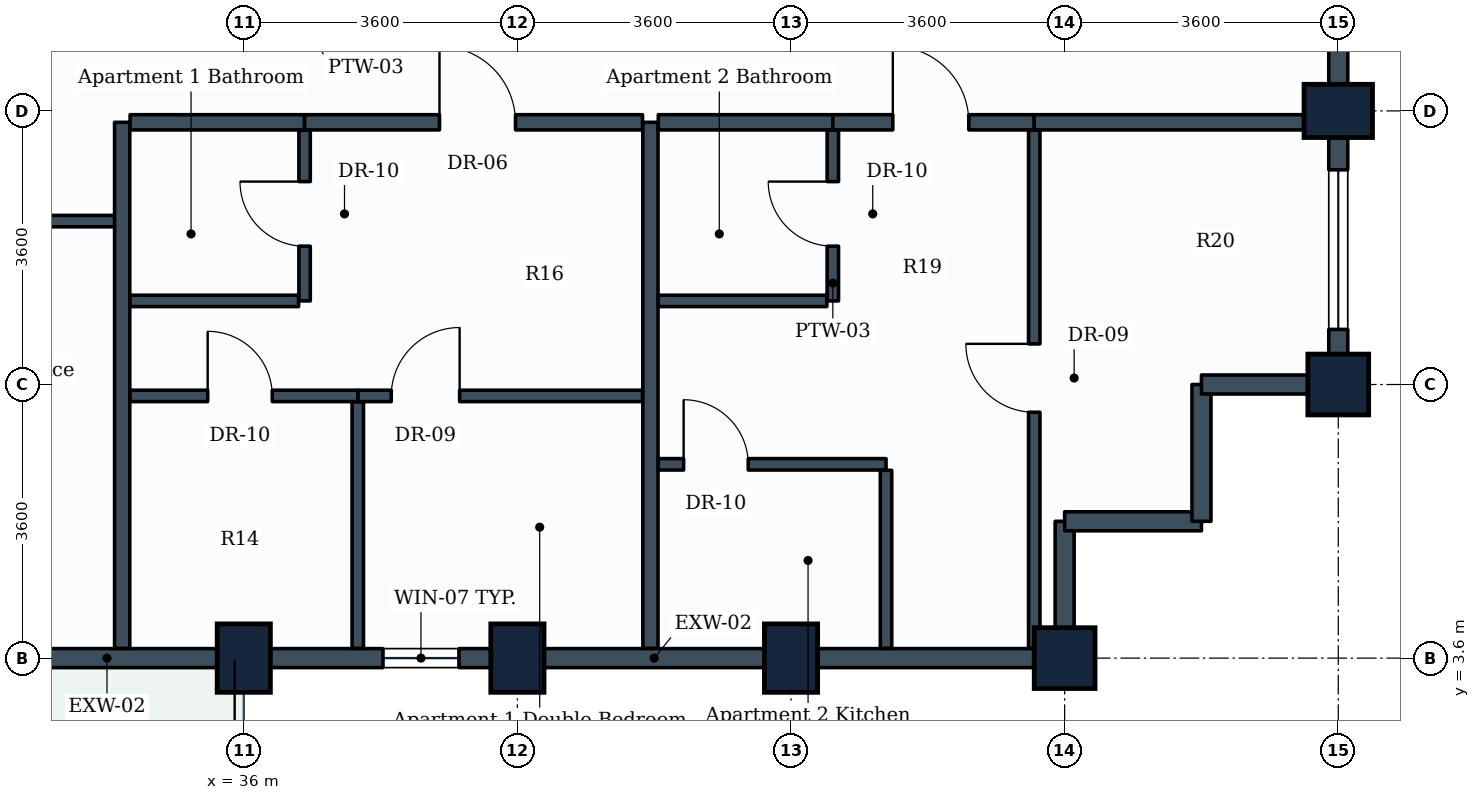
"""IFC4 building model, lengths in metres.
Left out: names, types, materials, properties, quantities, classifications, styles, units other than length and angle.
Written with IfcOpenShell. Run it as: python <this file> out.ifc"""

import sys

from ifc_helpers import new_model, si_unit, direction, frame, frame_2d, origin, origin_2d, place, context, subcontext, project, spatial, rectangle, extrude, element, fill, save


model = new_model("IFC4")
c1 = context("Model", 3, precision=1e-05, world=origin(), true_north=direction((0.0, 1.0)))
c2 = subcontext(c1, "Body", "Model", "MODEL_VIEW")
j1 = project(units=[si_unit("LENGTHUNIT", "METRE"), si_unit("PLANEANGLEUNIT", "RADIAN")], contexts=[c1])
p1 = place(None, origin())
s1 = spatial("IfcSite", under=j1, at=p1, CompositionType="ELEMENT")
p2 = place(p1, origin())
s2 = spatial("IfcBuilding", under=s1, at=p2, CompositionType="ELEMENT")
p3 = place(p2, frame((0.0, 0.0, 178.6)))
s3 = spatial("IfcBuildingStorey", under=s2, at=p3, CompositionType="ELEMENT", Elevation=178.6)
for number, where, z_axis, x_axis in (
    (1, (36.0, 3.6, 0.0), (0.0, 0.0, 1.0), (1.0, 0.0, 0.0)),
    (2, (39.6, 3.6, 0.0), (0.0, 0.0, 1.0), (1.0, 0.0, 0.0)),
    (3, (43.2, 3.6, 0.0), (0.0, 0.0, 1.0), (1.0, 0.0, 0.0)),
):
    element("IfcColumn", number, at=place(p3, frame(where, z_axis=z_axis, x_axis=x_axis)), inside=s3, PredefinedType="COLUMN", context=c2, shape_type="SweptSolid", body=[
        extrude(rectangle(XDim=0.7, YDim=0.9, at=origin_2d()), origin(), (0.0, 0.0, 1.0), 3.8),
    ])
for number, where, z_axis, x_axis in (
    (4, (46.8, 3.6, 0.0), (0.0, 0.0, 1.0), (1.0, 0.0, 0.0)),
    (5, (50.4, 7.2, 0.0), (0.0, 0.0, 1.0), (1.0, 0.0, 0.0)),
):
    element("IfcColumn", number, at=place(p3, frame(where, z_axis=z_axis, x_axis=x_axis)), inside=s3, PredefinedType="COLUMN", context=c2, shape_type="SweptSolid", body=[
        extrude(rectangle(XDim=0.8, YDim=0.8, at=origin_2d()), origin(), (0.0, 0.0, 1.0), 3.8),
    ])
p4 = place(p3, frame((50.4, 10.8, 0.0), z_axis=(0.0, 0.0, 1.0), x_axis=(0.0, 1.0, 0.0)))
e6 = element("IfcColumn", 6, at=p4, inside=s3, PredefinedType="COLUMN", context=c2, shape_type="SweptSolid", body=[
    extrude(rectangle(XDim=0.7, YDim=0.9, at=origin_2d()), origin(), (0.0, 0.0, 1.0), 3.8),
])
p5 = place(p3, frame((36.0, 3.6, 0.0), z_axis=(0.0, 0.0, 1.0), x_axis=(-1.0, 0.0, 0.0)))
e7 = element("IfcWall", 7, at=p5, inside=s3, PredefinedType="STANDARD", context=c2, shape_type="SweptSolid", body=[
    extrude(rectangle(XDim=3.6, YDim=0.25, at=frame_2d((1.8, 0.0))), origin(), (0.0, 0.0, 1.0), 2.93),
])
p6 = place(p3, frame((39.6, 3.6, 0.0), z_axis=(0.0, 0.0, 1.0), x_axis=(-1.0, 0.0, 0.0)))
e8 = element("IfcWall", 8, at=p6, inside=s3, PredefinedType="STANDARD", context=c2, shape_type="SweptSolid", body=[
    extrude(rectangle(XDim=3.6, YDim=0.25, at=frame_2d((1.8, 0.0))), origin(), (0.0, 0.0, 1.0), 2.93),
])
p7 = place(p6, frame((0.769, 0.0, 0.85)))
e9 = element("IfcOpeningElement", 9, at=p7, cuts=e8, PredefinedType="OPENING", context=c2, shape_type="SweptSolid", body=[
    extrude(rectangle(XDim=1.0, YDim=1.35, at=frame_2d((0.5, 0.675))), frame((0.0, 0.135, 0.0), z_axis=(0.0, -1.0, 0.0), x_axis=(1.0, 0.0, 0.0)), (0.0, 0.0, 1.0), 0.27),
])
p8 = place(p3, frame((43.2, 3.6, 0.0), z_axis=(0.0, 0.0, 1.0), x_axis=(-1.0, 0.0, 0.0)))
e10 = element("IfcWall", 10, at=p8, inside=s3, PredefinedType="STANDARD", context=c2, shape_type="SweptSolid", body=[
    extrude(rectangle(XDim=3.6, YDim=0.25, at=frame_2d((1.8, 0.0))), origin(), (0.0, 0.0, 1.0), 2.93),
])
p9 = place(p3, frame((46.8, 3.6, 0.0), z_axis=(0.0, 0.0, 1.0), x_axis=(-1.0, 0.0, 0.0)))
e11 = element("IfcWall", 11, at=p9, inside=s3, PredefinedType="STANDARD", context=c2, shape_type="SweptSolid", body=[
    extrude(rectangle(XDim=3.6, YDim=0.25, at=frame_2d((1.8, 0.0))), origin(), (0.0, 0.0, 1.0), 2.93),
])
p10 = place(p3, frame((46.8, 5.4, 0.0), z_axis=(0.0, 0.0, 1.0), x_axis=(0.0, -1.0, 0.0)))
e12 = element("IfcWall", 12, at=p10, inside=s3, PredefinedType="STANDARD", context=c2, shape_type="SweptSolid", body=[
    extrude(rectangle(XDim=1.8, YDim=0.25, at=frame_2d((0.9, 0.0))), origin(), (0.0, 0.0, 1.0), 2.93),
])
for number, where, z_axis, x_axis in (
    (13, (48.6, 5.4, 0.0), (0.0, 0.0, 1.0), (-1.0, 0.0, 0.0)),
    (14, (48.6, 7.2, 0.0), (0.0, 0.0, 1.0), (0.0, -1.0, 0.0)),
):
    element("IfcWall", number, at=place(p3, frame(where, z_axis=z_axis, x_axis=x_axis)), inside=s3, PredefinedType="STANDARD", context=c2, shape_type="SweptSolid", body=[
        extrude(rectangle(XDim=1.8, YDim=0.25, at=frame_2d((0.9, 0.0))), origin(), (0.0, 0.0, 1.0), 3.535),
    ])
p11 = place(p3, frame((50.4, 7.2, 0.0), z_axis=(0.0, 0.0, 1.0), x_axis=(-1.0, 0.0, 0.0)))
e15 = element("IfcWall", 15, at=p11, inside=s3, PredefinedType="STANDARD", context=c2, shape_type="SweptSolid", body=[
    extrude(rectangle(XDim=1.8, YDim=0.25, at=frame_2d((0.9, 0.0))), origin(), (0.0, 0.0, 1.0), 2.93),
])
p12 = place(p3, frame((50.4, 10.8, 0.0), z_axis=(0.0, 0.0, 1.0), x_axis=(0.0, -1.0, 0.0)))
e16 = element("IfcWall", 16, at=p12, inside=s3, PredefinedType="STANDARD", context=c2, shape_type="SweptSolid", body=[
    extrude(rectangle(XDim=3.6, YDim=0.25, at=frame_2d((1.8, 0.0))), origin(), (0.0, 0.0, 1.0), 2.93),
])
p13 = place(p12, frame((0.775, 0.0, 0.85)))
e17 = element("IfcOpeningElement", 17, at=p13, cuts=e16, PredefinedType="OPENING", context=c2, shape_type="SweptSolid", body=[
    extrude(rectangle(XDim=2.1, YDim=1.35, at=frame_2d((1.05, 0.675))), frame((0.0, 0.135, 0.0), z_axis=(0.0, -1.0, 0.0), x_axis=(1.0, 0.0, 0.0)), (0.0, 0.0, 1.0), 0.27),
])
p14 = place(p3, frame((50.4, 14.4, 0.0), z_axis=(0.0, 0.0, 1.0), x_axis=(0.0, -1.0, 0.0)))
e18 = element("IfcWall", 18, at=p14, inside=s3, PredefinedType="STANDARD", context=c2, shape_type="SweptSolid", body=[
    extrude(rectangle(XDim=3.6, YDim=0.25, at=frame_2d((1.8, 0.0))), origin(), (0.0, 0.0, 1.0), 2.93),
])
p15 = place(p3, frame((28.879, 9.35, 0.0), z_axis=(0.0, 0.0, 1.0), x_axis=(1.0, 0.0, 0.0)))
e19 = element("IfcWall", 19, at=p15, inside=s3, PredefinedType="PARTITIONING", context=c2, shape_type="SweptSolid", body=[
    extrude(rectangle(XDim=5.521, YDim=0.15, at=frame_2d((2.76, 0.0))), origin(), (0.0, 0.0, 1.0), 3.535),
])
p16 = place(p15, frame((0.36, 0.0, 0.0)))
e20 = element("IfcOpeningElement", 20, at=p16, cuts=e19, PredefinedType="OPENING", context=c2, shape_type="SweptSolid", body=[
    extrude(rectangle(XDim=1.0, YDim=2.1, at=frame_2d((0.5, 1.05))), frame((0.0, 0.085, 0.0), z_axis=(0.0, -1.0, 0.0), x_axis=(1.0, 0.0, 0.0)), (0.0, 0.0, 1.0), 0.17),
])
for number, where, z_axis, x_axis in (
    (21, (34.4, 3.729, 0.0), (0.0, 0.0, 1.0), (0.0, 1.0, 0.0)),
    (22, (41.35, 3.729, 0.0), (0.0, 0.0, 1.0), (0.0, 1.0, 0.0)),
):
    element("IfcWall", number, at=place(p3, frame(where, z_axis=z_axis, x_axis=x_axis)), inside=s3, PredefinedType="PARTITIONING", context=c2, shape_type="SweptSolid", body=[
        extrude(rectangle(XDim=6.921, YDim=0.2, at=frame_2d((3.46, 0.0))), origin(), (0.0, 0.0, 1.0), 2.93),
    ])
p17 = place(p3, frame((34.504, 10.65, 0.0), z_axis=(0.0, 0.0, 1.0), x_axis=(1.0, 0.0, 0.0)))
e23 = element("IfcWall", 23, at=p17, inside=s3, PredefinedType="PARTITIONING", context=c2, shape_type="SweptSolid", body=[
    extrude(rectangle(XDim=2.296, YDim=0.2, at=frame_2d((1.148, 0.0))), origin(), (0.0, 0.0, 1.0), 3.22),
])
p18 = place(p3, frame((36.8, 8.3, 0.0), z_axis=(0.0, 0.0, 1.0), x_axis=(0.0, 1.0, 0.0)))
e24 = element("IfcWall", 24, at=p18, inside=s3, PredefinedType="PARTITIONING", context=c2, shape_type="SweptSolid", body=[
    extrude(rectangle(XDim=2.246, YDim=0.15, at=frame_2d((1.123, 0.0))), origin(), (0.0, 0.0, 1.0), 3.535),
])
p19 = place(p18, frame((0.72, 0.0, 0.0)))
e25 = element("IfcOpeningElement", 25, at=p19, cuts=e24, PredefinedType="OPENING", context=c2, shape_type="SweptSolid", body=[
    extrude(rectangle(XDim=0.85, YDim=2.1, at=frame_2d((0.425, 1.05))), frame((0.0, 0.085, 0.0), z_axis=(0.0, -1.0, 0.0), x_axis=(1.0, 0.0, 0.0)), (0.0, 0.0, 1.0), 0.17),
])
p20 = place(p3, frame((34.504, 8.3, 0.0), z_axis=(0.0, 0.0, 1.0), x_axis=(1.0, 0.0, 0.0)))
e26 = element("IfcWall", 26, at=p20, inside=s3, PredefinedType="PARTITIONING", context=c2, shape_type="SweptSolid", body=[
    extrude(rectangle(XDim=2.217, YDim=0.15, at=frame_2d((1.108, 0.0))), origin(), (0.0, 0.0, 1.0), 3.22),
])
p21 = place(p3, frame((36.8, 10.65, 0.0), z_axis=(0.0, 0.0, 1.0), x_axis=(1.0, 0.0, 0.0)))
e27 = element("IfcWall", 27, at=p21, inside=s3, PredefinedType="PARTITIONING", context=c2, shape_type="SweptSolid", body=[
    extrude(rectangle(XDim=4.446, YDim=0.2, at=frame_2d((2.223, 0.0))), origin(), (0.0, 0.0, 1.0), 3.17),
])
p22 = place(p21, frame((1.775, 0.0, 0.0)))
e28 = element("IfcOpeningElement", 28, at=p22, cuts=e27, PredefinedType="OPENING", context=c2, shape_type="SweptSolid", body=[
    extrude(rectangle(XDim=1.0, YDim=2.1, at=frame_2d((0.5, 1.05))), frame((0.0, 0.11, 0.0), z_axis=(0.0, -1.0, 0.0), x_axis=(1.0, 0.0, 0.0)), (0.0, 0.0, 1.0), 0.22),
])
p23 = place(p3, frame((37.5, 7.05, 0.0), z_axis=(0.0, 0.0, 1.0), x_axis=(1.0, 0.0, 0.0)))
e29 = element("IfcWall", 29, at=p23, inside=s3, PredefinedType="PARTITIONING", context=c2, shape_type="SweptSolid", body=[
    extrude(rectangle(XDim=3.746, YDim=0.15, at=frame_2d((1.873, 0.0))), origin(), (0.0, 0.0, 1.0), 3.17),
])
p24 = place(p23, frame((0.44, 0.0, 0.0)))
e30 = element("IfcOpeningElement", 30, at=p24, cuts=e29, PredefinedType="OPENING", context=c2, shape_type="SweptSolid", body=[
    extrude(rectangle(XDim=0.9, YDim=2.1, at=frame_2d((0.45, 1.05))), frame((0.0, 0.085, 0.0), z_axis=(0.0, -1.0, 0.0), x_axis=(1.0, 0.0, 0.0)), (0.0, 0.0, 1.0), 0.17),
])
p25 = place(p3, frame((34.504, 7.05, 0.0), z_axis=(0.0, 0.0, 1.0), x_axis=(1.0, 0.0, 0.0)))
e31 = element("IfcWall", 31, at=p25, inside=s3, PredefinedType="PARTITIONING", context=c2, shape_type="SweptSolid", body=[
    extrude(rectangle(XDim=2.996, YDim=0.15, at=frame_2d((1.498, 0.0))), origin(), (0.0, 0.0, 1.0), 3.17),
])
p26 = place(p25, frame((1.021, 0.0, 0.0)))
e32 = element("IfcOpeningElement", 32, at=p26, cuts=e31, PredefinedType="OPENING", context=c2, shape_type="SweptSolid", body=[
    extrude(rectangle(XDim=0.85, YDim=2.1, at=frame_2d((0.425, 1.05))), frame((0.0, 0.085, 0.0), z_axis=(0.0, -1.0, 0.0), x_axis=(1.0, 0.0, 0.0)), (0.0, 0.0, 1.0), 0.17),
])
p27 = place(p3, frame((37.5, 3.729, 0.0), z_axis=(0.0, 0.0, 1.0), x_axis=(0.0, 1.0, 0.0)))
e33 = element("IfcWall", 33, at=p27, inside=s3, PredefinedType="PARTITIONING", context=c2, shape_type="SweptSolid", body=[
    extrude(rectangle(XDim=3.242, YDim=0.15, at=frame_2d((1.621, 0.0))), origin(), (0.0, 0.0, 1.0), 2.93),
])
p28 = place(p3, frame((41.454, 10.65, 0.0), z_axis=(0.0, 0.0, 1.0), x_axis=(1.0, 0.0, 0.0)))
e34 = element("IfcWall", 34, at=p28, inside=s3, PredefinedType="PARTITIONING", context=c2, shape_type="SweptSolid", body=[
    extrude(rectangle(XDim=2.296, YDim=0.2, at=frame_2d((1.148, 0.0))), origin(), (0.0, 0.0, 1.0), 3.17),
])
p29 = place(p3, frame((43.75, 8.3, 0.0), z_axis=(0.0, 0.0, 1.0), x_axis=(0.0, 1.0, 0.0)))
e35 = element("IfcWall", 35, at=p29, inside=s3, PredefinedType="PARTITIONING", context=c2, shape_type="SweptSolid", body=[
    extrude(rectangle(XDim=2.246, YDim=0.15, at=frame_2d((1.123, 0.0))), origin(), (0.0, 0.0, 1.0), 3.535),
])
p30 = place(p29, frame((0.72, 0.0, 0.0)))
e36 = element("IfcOpeningElement", 36, at=p30, cuts=e35, PredefinedType="OPENING", context=c2, shape_type="SweptSolid", body=[
    extrude(rectangle(XDim=0.85, YDim=2.1, at=frame_2d((0.425, 1.05))), frame((0.0, 0.085, 0.0), z_axis=(0.0, -1.0, 0.0), x_axis=(1.0, 0.0, 0.0)), (0.0, 0.0, 1.0), 0.17),
])
p31 = place(p3, frame((41.454, 8.3, 0.0), z_axis=(0.0, 0.0, 1.0), x_axis=(1.0, 0.0, 0.0)))
e37 = element("IfcWall", 37, at=p31, inside=s3, PredefinedType="PARTITIONING", context=c2, shape_type="SweptSolid", body=[
    extrude(rectangle(XDim=2.217, YDim=0.15, at=frame_2d((1.108, 0.0))), origin(), (0.0, 0.0, 1.0), 3.18),
])
p32 = place(p3, frame((43.75, 10.65, 0.0), z_axis=(0.0, 0.0, 1.0), x_axis=(1.0, 0.0, 0.0)))
e38 = element("IfcWall", 38, at=p32, inside=s3, PredefinedType="PARTITIONING", context=c2, shape_type="SweptSolid", body=[
    extrude(rectangle(XDim=2.65, YDim=0.2, at=frame_2d((1.325, 0.0))), origin(), (0.0, 0.0, 1.0), 3.535),
])
p33 = place(p32, frame((0.789, 0.0, 0.0)))
e39 = element("IfcOpeningElement", 39, at=p33, cuts=e38, PredefinedType="OPENING", context=c2, shape_type="SweptSolid", body=[
    extrude(rectangle(XDim=1.0, YDim=2.1, at=frame_2d((0.5, 1.05))), frame((0.0, 0.11, 0.0), z_axis=(0.0, -1.0, 0.0), x_axis=(1.0, 0.0, 0.0)), (0.0, 0.0, 1.0), 0.22),
])
p34 = place(p3, frame((46.4, 10.65, 0.0), z_axis=(0.0, 0.0, 1.0), x_axis=(1.0, 0.0, 0.0)))
e40 = element("IfcWall", 40, at=p34, inside=s3, PredefinedType="PARTITIONING", context=c2, shape_type="SweptSolid", body=[
    extrude(rectangle(XDim=3.871, YDim=0.2, at=frame_2d((1.936, 0.0))), origin(), (0.0, 0.0, 1.0), 2.93),
])
p35 = place(p3, frame((46.4, 3.729, 0.0), z_axis=(0.0, 0.0, 1.0), x_axis=(0.0, 1.0, 0.0)))
e41 = element("IfcWall", 41, at=p35, inside=s3, PredefinedType="PARTITIONING", context=c2, shape_type="SweptSolid", body=[
    extrude(rectangle(XDim=6.817, YDim=0.15, at=frame_2d((3.408, 0.0))), origin(), (0.0, 0.0, 1.0), 2.93),
])
p36 = place(p35, frame((3.106, 0.0, 0.0)))
e42 = element("IfcOpeningElement", 42, at=p36, cuts=e41, PredefinedType="OPENING", context=c2, shape_type="SweptSolid", body=[
    extrude(rectangle(XDim=0.9, YDim=2.1, at=frame_2d((0.45, 1.05))), frame((0.0, 0.085, 0.0), z_axis=(0.0, -1.0, 0.0), x_axis=(1.0, 0.0, 0.0)), (0.0, 0.0, 1.0), 0.17),
])
p37 = place(p3, frame((41.454, 6.15, 0.0), z_axis=(0.0, 0.0, 1.0), x_axis=(1.0, 0.0, 0.0)))
e43 = element("IfcWall", 43, at=p37, inside=s3, PredefinedType="PARTITIONING", context=c2, shape_type="SweptSolid", body=[
    extrude(rectangle(XDim=2.996, YDim=0.15, at=frame_2d((1.498, 0.0))), origin(), (0.0, 0.0, 1.0), 3.18),
])
p38 = place(p37, frame((0.333, 0.0, 0.0)))
e44 = element("IfcOpeningElement", 44, at=p38, cuts=e43, PredefinedType="OPENING", context=c2, shape_type="SweptSolid", body=[
    extrude(rectangle(XDim=0.85, YDim=2.1, at=frame_2d((0.425, 1.05))), frame((0.0, 0.085, 0.0), z_axis=(0.0, -1.0, 0.0), x_axis=(1.0, 0.0, 0.0)), (0.0, 0.0, 1.0), 0.17),
])
p39 = place(p3, frame((44.45, 3.729, 0.0), z_axis=(0.0, 0.0, 1.0), x_axis=(0.0, 1.0, 0.0)))
e45 = element("IfcWall", 45, at=p39, inside=s3, PredefinedType="PARTITIONING", context=c2, shape_type="SweptSolid", body=[
    extrude(rectangle(XDim=2.342, YDim=0.15, at=frame_2d((1.171, 0.0))), origin(), (0.0, 0.0, 1.0), 2.93),
])
p40 = place(p13, origin())
e46 = element("IfcWindow", 46, at=p40, inside=s3, PartitioningType="SINGLE_PANEL", PredefinedType="WINDOW", context=c2, shape_type="SweptSolid", body=[
    extrude(rectangle(XDim=2.1, YDim=1.35, at=frame_2d((1.05, 0.675))), frame((0.0, 0.03, 0.0), z_axis=(0.0, -1.0, 0.0), x_axis=(1.0, 0.0, 0.0)), (0.0, 0.0, 1.0), 0.06),
])
fill(e17, e46)
p41 = place(p19, origin())
e47 = element("IfcDoor", 47, at=p41, inside=s3, OperationType="SINGLE_SWING_RIGHT", PredefinedType="DOOR", context=c2, shape_type="SweptSolid", body=[
    extrude(rectangle(XDim=0.85, YDim=2.1, at=frame_2d((0.425, 1.05))), frame((0.0, 0.025, 0.0), z_axis=(0.0, -1.0, 0.0), x_axis=(1.0, 0.0, 0.0)), (0.0, 0.0, 1.0), 0.05),
])
fill(e25, e47)
p42 = place(p22, origin())
e48 = element("IfcDoor", 48, at=p42, inside=s3, OperationType="SINGLE_SWING_LEFT", PredefinedType="DOOR", context=c2, shape_type="SweptSolid", body=[
    extrude(rectangle(XDim=1.0, YDim=2.1, at=frame_2d((0.5, 1.05))), frame((0.0, 0.025, 0.0), z_axis=(0.0, -1.0, 0.0), x_axis=(1.0, 0.0, 0.0)), (0.0, 0.0, 1.0), 0.05),
])
fill(e28, e48)
p43 = place(p24, origin())
e49 = element("IfcDoor", 49, at=p43, inside=s3, OperationType="SINGLE_SWING_RIGHT", PredefinedType="DOOR", context=c2, shape_type="SweptSolid", body=[
    extrude(rectangle(XDim=0.9, YDim=2.1, at=frame_2d((0.45, 1.05))), frame((0.0, 0.025, 0.0), z_axis=(0.0, -1.0, 0.0), x_axis=(1.0, 0.0, 0.0)), (0.0, 0.0, 1.0), 0.05),
])
fill(e30, e49)
p44 = place(p26, origin())
e50 = element("IfcDoor", 50, at=p44, inside=s3, OperationType="SINGLE_SWING_LEFT", PredefinedType="DOOR", context=c2, shape_type="SweptSolid", body=[
    extrude(rectangle(XDim=0.85, YDim=2.1, at=frame_2d((0.425, 1.05))), frame((0.0, 0.025, 0.0), z_axis=(0.0, -1.0, 0.0), x_axis=(1.0, 0.0, 0.0)), (0.0, 0.0, 1.0), 0.05),
])
fill(e32, e50)
p45 = place(p30, origin())
e51 = element("IfcDoor", 51, at=p45, inside=s3, OperationType="SINGLE_SWING_RIGHT", PredefinedType="DOOR", context=c2, shape_type="SweptSolid", body=[
    extrude(rectangle(XDim=0.85, YDim=2.1, at=frame_2d((0.425, 1.05))), frame((0.0, 0.025, 0.0), z_axis=(0.0, -1.0, 0.0), x_axis=(1.0, 0.0, 0.0)), (0.0, 0.0, 1.0), 0.05),
])
fill(e36, e51)
p46 = place(p33, origin())
e52 = element("IfcDoor", 52, at=p46, inside=s3, OperationType="SINGLE_SWING_LEFT", PredefinedType="DOOR", context=c2, shape_type="SweptSolid", body=[
    extrude(rectangle(XDim=1.0, YDim=2.1, at=frame_2d((0.5, 1.05))), frame((0.0, 0.025, 0.0), z_axis=(0.0, -1.0, 0.0), x_axis=(1.0, 0.0, 0.0)), (0.0, 0.0, 1.0), 0.05),
])
fill(e39, e52)
p47 = place(p36, origin())
e53 = element("IfcDoor", 53, at=p47, inside=s3, OperationType="SINGLE_SWING_RIGHT", PredefinedType="DOOR", context=c2, shape_type="SweptSolid", body=[
    extrude(rectangle(XDim=0.9, YDim=2.1, at=frame_2d((0.45, 1.05))), frame((0.0, 0.025, 0.0), z_axis=(0.0, -1.0, 0.0), x_axis=(1.0, 0.0, 0.0)), (0.0, 0.0, 1.0), 0.05),
])
fill(e42, e53)
p48 = place(p38, origin())
e54 = element("IfcDoor", 54, at=p48, inside=s3, OperationType="SINGLE_SWING_LEFT", PredefinedType="DOOR", context=c2, shape_type="SweptSolid", body=[
    extrude(rectangle(XDim=0.85, YDim=2.1, at=frame_2d((0.425, 1.05))), frame((0.0, 0.025, 0.0), z_axis=(0.0, -1.0, 0.0), x_axis=(1.0, 0.0, 0.0)), (0.0, 0.0, 1.0), 0.05),
])
fill(e44, e54)
p49 = place(p7, origin())
e55 = element("IfcWindow", 55, at=p49, inside=s3, PartitioningType="SINGLE_PANEL", PredefinedType="WINDOW", context=c2, shape_type="SweptSolid", body=[
    extrude(rectangle(XDim=1.0, YDim=1.35, at=frame_2d((0.5, 0.675))), frame((0.0, 0.03, 0.0), z_axis=(0.0, -1.0, 0.0), x_axis=(1.0, 0.0, 0.0)), (0.0, 0.0, 1.0), 0.06),
])
fill(e9, e55)
save(model, sys.argv[1])
